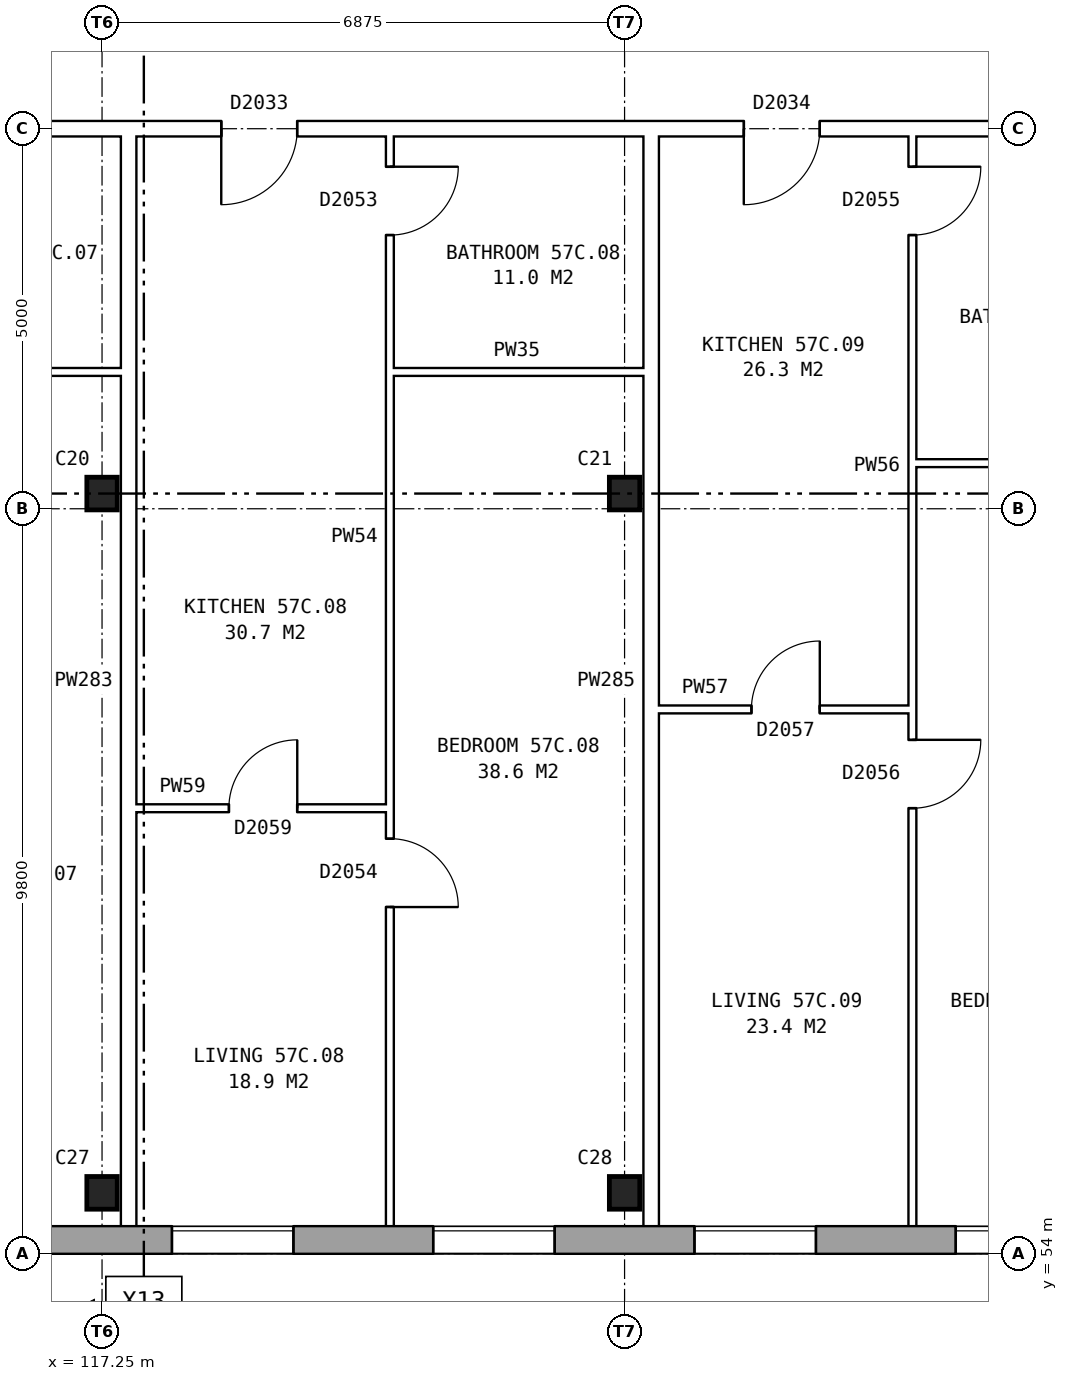
"""IFC4 building model, lengths in metres.
Left out: names, types, materials, properties, quantities, classifications, styles, units other than length and angle.
Written with IfcOpenShell. Run it as: python <this file> out.ifc"""

import sys

from ifc_helpers import new_model, si_unit, direction, frame, frame_2d, origin, origin_2d, place, context, subcontext, project, spatial, rectangle, i_section, extrude, element, fill, save


model = new_model("IFC4")
c1 = context("Model", 3, precision=1e-05, world=origin(), true_north=direction((0.0, 1.0)))
c2 = subcontext(c1, "Body", "Model", "MODEL_VIEW")
j1 = project(units=[si_unit("LENGTHUNIT", "METRE"), si_unit("PLANEANGLEUNIT", "RADIAN")], contexts=[c1])
p1 = place(None, origin())
s1 = spatial("IfcSite", under=j1, at=p1, CompositionType="ELEMENT")
p2 = place(p1, origin())
s2 = spatial("IfcBuilding", under=s1, at=p2, CompositionType="ELEMENT")
p3 = place(p2, frame((0.0, 0.0, 202.8)))
s3 = spatial("IfcBuildingStorey", under=s2, at=p3, CompositionType="ELEMENT", Elevation=202.8)
for number, where, z_axis, x_axis in (
    (1, (117.25, 54.8, 0.0), (0.0, 0.0, 1.0), (1.0, 0.0, 0.0)),
    (2, (124.125, 54.8, 0.0), (0.0, 0.0, 1.0), (1.0, 0.0, 0.0)),
    (3, (117.25, 64.0, 0.0), (0.0, 0.0, 1.0), (1.0, 0.0, 0.0)),
    (4, (124.125, 64.0, 0.0), (0.0, 0.0, 1.0), (1.0, 0.0, 0.0)),
):
    element("IfcColumn", number, at=place(p3, frame(where, z_axis=z_axis, x_axis=x_axis)), inside=s3, PredefinedType="COLUMN", context=c2, shape_type="SweptSolid", body=[
        extrude(i_section(OverallWidth=0.4, OverallDepth=0.43, WebThickness=0.04, FlangeThickness=0.04, at=origin_2d()), origin(), (0.0, 0.0, 1.0), 2.85),
    ])
p4 = place(p3, frame((75.95, 54.18, 0.0), z_axis=(0.0, 0.0, 1.0), x_axis=(1.0, 0.0, 0.0)))
e5 = element("IfcWall", 5, at=p4, inside=s3, PredefinedType="STANDARD", context=c2, shape_type="SweptSolid", body=[
    extrude(rectangle(XDim=55.1, YDim=0.36, at=frame_2d((27.55, 0.0))), origin(), (0.0, 0.0, 1.0), 2.85),
])
p5 = place(p4, frame((0.969, 0.0, 0.8)))
e6 = element("IfcOpeningElement", 6, at=p5, cuts=e5, PredefinedType="OPENING", context=c2, shape_type="SweptSolid", body=[
    extrude(rectangle(XDim=1.6, YDim=1.8, at=frame_2d((0.8, 0.9))), frame((0.0, 0.19, 0.0), z_axis=(0.0, -1.0, 0.0), x_axis=(1.0, 0.0, 0.0)), (0.0, 0.0, 1.0), 0.38),
])
p6 = place(p4, frame((4.406, 0.0, 0.8)))
e7 = element("IfcOpeningElement", 7, at=p6, cuts=e5, PredefinedType="OPENING", context=c2, shape_type="SweptSolid", body=[
    extrude(rectangle(XDim=1.6, YDim=1.8, at=frame_2d((0.8, 0.9))), frame((0.0, 0.19, 0.0), z_axis=(0.0, -1.0, 0.0), x_axis=(1.0, 0.0, 0.0)), (0.0, 0.0, 1.0), 0.38),
])
p7 = place(p4, frame((7.844, 0.0, 0.8)))
e8 = element("IfcOpeningElement", 8, at=p7, cuts=e5, PredefinedType="OPENING", context=c2, shape_type="SweptSolid", body=[
    extrude(rectangle(XDim=1.6, YDim=1.8, at=frame_2d((0.8, 0.9))), frame((0.0, 0.19, 0.0), z_axis=(0.0, -1.0, 0.0), x_axis=(1.0, 0.0, 0.0)), (0.0, 0.0, 1.0), 0.38),
])
p8 = place(p4, frame((11.281, 0.0, 0.8)))
e9 = element("IfcOpeningElement", 9, at=p8, cuts=e5, PredefinedType="OPENING", context=c2, shape_type="SweptSolid", body=[
    extrude(rectangle(XDim=1.6, YDim=1.8, at=frame_2d((0.8, 0.9))), frame((0.0, 0.19, 0.0), z_axis=(0.0, -1.0, 0.0), x_axis=(1.0, 0.0, 0.0)), (0.0, 0.0, 1.0), 0.38),
])
p9 = place(p4, frame((14.719, 0.0, 0.8)))
e10 = element("IfcOpeningElement", 10, at=p9, cuts=e5, PredefinedType="OPENING", context=c2, shape_type="SweptSolid", body=[
    extrude(rectangle(XDim=1.6, YDim=1.8, at=frame_2d((0.8, 0.9))), frame((0.0, 0.19, 0.0), z_axis=(0.0, -1.0, 0.0), x_axis=(1.0, 0.0, 0.0)), (0.0, 0.0, 1.0), 0.38),
])
p10 = place(p4, frame((18.156, 0.0, 0.8)))
e11 = element("IfcOpeningElement", 11, at=p10, cuts=e5, PredefinedType="OPENING", context=c2, shape_type="SweptSolid", body=[
    extrude(rectangle(XDim=1.6, YDim=1.8, at=frame_2d((0.8, 0.9))), frame((0.0, 0.19, 0.0), z_axis=(0.0, -1.0, 0.0), x_axis=(1.0, 0.0, 0.0)), (0.0, 0.0, 1.0), 0.38),
])
p11 = place(p4, frame((21.594, 0.0, 0.8)))
e12 = element("IfcOpeningElement", 12, at=p11, cuts=e5, PredefinedType="OPENING", context=c2, shape_type="SweptSolid", body=[
    extrude(rectangle(XDim=1.6, YDim=1.8, at=frame_2d((0.8, 0.9))), frame((0.0, 0.19, 0.0), z_axis=(0.0, -1.0, 0.0), x_axis=(1.0, 0.0, 0.0)), (0.0, 0.0, 1.0), 0.38),
])
p12 = place(p4, frame((25.031, 0.0, 0.8)))
e13 = element("IfcOpeningElement", 13, at=p12, cuts=e5, PredefinedType="OPENING", context=c2, shape_type="SweptSolid", body=[
    extrude(rectangle(XDim=1.6, YDim=1.8, at=frame_2d((0.8, 0.9))), frame((0.0, 0.19, 0.0), z_axis=(0.0, -1.0, 0.0), x_axis=(1.0, 0.0, 0.0)), (0.0, 0.0, 1.0), 0.38),
])
p13 = place(p4, frame((28.469, 0.0, 0.8)))
e14 = element("IfcOpeningElement", 14, at=p13, cuts=e5, PredefinedType="OPENING", context=c2, shape_type="SweptSolid", body=[
    extrude(rectangle(XDim=1.6, YDim=1.8, at=frame_2d((0.8, 0.9))), frame((0.0, 0.19, 0.0), z_axis=(0.0, -1.0, 0.0), x_axis=(1.0, 0.0, 0.0)), (0.0, 0.0, 1.0), 0.38),
])
p14 = place(p4, frame((31.906, 0.0, 0.8)))
e15 = element("IfcOpeningElement", 15, at=p14, cuts=e5, PredefinedType="OPENING", context=c2, shape_type="SweptSolid", body=[
    extrude(rectangle(XDim=1.6, YDim=1.8, at=frame_2d((0.8, 0.9))), frame((0.0, 0.19, 0.0), z_axis=(0.0, -1.0, 0.0), x_axis=(1.0, 0.0, 0.0)), (0.0, 0.0, 1.0), 0.38),
])
p15 = place(p4, frame((35.344, 0.0, 0.8)))
e16 = element("IfcOpeningElement", 16, at=p15, cuts=e5, PredefinedType="OPENING", context=c2, shape_type="SweptSolid", body=[
    extrude(rectangle(XDim=1.6, YDim=1.8, at=frame_2d((0.8, 0.9))), frame((0.0, 0.19, 0.0), z_axis=(0.0, -1.0, 0.0), x_axis=(1.0, 0.0, 0.0)), (0.0, 0.0, 1.0), 0.38),
])
p16 = place(p4, frame((38.781, 0.0, 0.8)))
e17 = element("IfcOpeningElement", 17, at=p16, cuts=e5, PredefinedType="OPENING", context=c2, shape_type="SweptSolid", body=[
    extrude(rectangle(XDim=1.6, YDim=1.8, at=frame_2d((0.8, 0.9))), frame((0.0, 0.19, 0.0), z_axis=(0.0, -1.0, 0.0), x_axis=(1.0, 0.0, 0.0)), (0.0, 0.0, 1.0), 0.38),
])
p17 = place(p4, frame((42.219, 0.0, 0.8)))
e18 = element("IfcOpeningElement", 18, at=p17, cuts=e5, PredefinedType="OPENING", context=c2, shape_type="SweptSolid", body=[
    extrude(rectangle(XDim=1.6, YDim=1.8, at=frame_2d((0.8, 0.9))), frame((0.0, 0.19, 0.0), z_axis=(0.0, -1.0, 0.0), x_axis=(1.0, 0.0, 0.0)), (0.0, 0.0, 1.0), 0.38),
])
p18 = place(p4, frame((45.656, 0.0, 0.8)))
e19 = element("IfcOpeningElement", 19, at=p18, cuts=e5, PredefinedType="OPENING", context=c2, shape_type="SweptSolid", body=[
    extrude(rectangle(XDim=1.6, YDim=1.8, at=frame_2d((0.8, 0.9))), frame((0.0, 0.19, 0.0), z_axis=(0.0, -1.0, 0.0), x_axis=(1.0, 0.0, 0.0)), (0.0, 0.0, 1.0), 0.38),
])
p19 = place(p4, frame((49.094, 0.0, 0.8)))
e20 = element("IfcOpeningElement", 20, at=p19, cuts=e5, PredefinedType="OPENING", context=c2, shape_type="SweptSolid", body=[
    extrude(rectangle(XDim=1.6, YDim=1.8, at=frame_2d((0.8, 0.9))), frame((0.0, 0.19, 0.0), z_axis=(0.0, -1.0, 0.0), x_axis=(1.0, 0.0, 0.0)), (0.0, 0.0, 1.0), 0.38),
])
p20 = place(p4, frame((52.531, 0.0, 0.8)))
e21 = element("IfcOpeningElement", 21, at=p20, cuts=e5, PredefinedType="OPENING", context=c2, shape_type="SweptSolid", body=[
    extrude(rectangle(XDim=1.6, YDim=1.8, at=frame_2d((0.8, 0.9))), frame((0.0, 0.19, 0.0), z_axis=(0.0, -1.0, 0.0), x_axis=(1.0, 0.0, 0.0)), (0.0, 0.0, 1.0), 0.38),
])
p21 = place(p3, frame((117.7, 59.86, 0.0), z_axis=(0.0, 0.0, 1.0), x_axis=(1.0, 0.0, 0.0)))
e22 = element("IfcWall", 22, at=p21, inside=s3, PredefinedType="PARTITIONING", context=c2, shape_type="SweptSolid", body=[
    extrude(rectangle(XDim=3.337, YDim=0.1, at=frame_2d((1.668, 0.0))), origin(), (0.0, 0.0, 1.0), 2.85),
])
p22 = place(p21, frame((1.219, 0.0, 0.0)))
e23 = element("IfcOpeningElement", 23, at=p22, cuts=e22, PredefinedType="OPENING", context=c2, shape_type="SweptSolid", body=[
    extrude(rectangle(XDim=0.9, YDim=2.1, at=frame_2d((0.45, 1.05))), frame((0.0, 0.06, 0.0), z_axis=(0.0, -1.0, 0.0), x_axis=(1.0, 0.0, 0.0)), (0.0, 0.0, 1.0), 0.12),
])
p23 = place(p3, frame((124.575, 61.16, 0.0), z_axis=(0.0, 0.0, 1.0), x_axis=(1.0, 0.0, 0.0)))
e24 = element("IfcWall", 24, at=p23, inside=s3, PredefinedType="PARTITIONING", context=c2, shape_type="SweptSolid", body=[
    extrude(rectangle(XDim=3.337, YDim=0.1, at=frame_2d((1.668, 0.0))), origin(), (0.0, 0.0, 1.0), 2.85),
])
p24 = place(p23, frame((1.219, 0.0, 0.0)))
e25 = element("IfcOpeningElement", 25, at=p24, cuts=e24, PredefinedType="OPENING", context=c2, shape_type="SweptSolid", body=[
    extrude(rectangle(XDim=0.9, YDim=2.1, at=frame_2d((0.45, 1.05))), frame((0.0, 0.06, 0.0), z_axis=(0.0, -1.0, 0.0), x_axis=(1.0, 0.0, 0.0)), (0.0, 0.0, 1.0), 0.12),
])
p25 = place(p3, frame((127.912, 64.4, 0.0), z_axis=(0.0, 0.0, 1.0), x_axis=(1.0, 0.0, 0.0)))
e26 = element("IfcWall", 26, at=p25, inside=s3, PredefinedType="PARTITIONING", context=c2, shape_type="SweptSolid", body=[
    extrude(rectangle(XDim=3.448, YDim=0.1, at=frame_2d((1.724, 0.0))), origin(), (0.0, 0.0, 1.0), 2.85),
])
for number, where, z_axis, x_axis in (
    (27, (114.162, 65.6, 0.0), (0.0, 0.0, 1.0), (1.0, 0.0, 0.0)),
    (28, (121.037, 65.6, 0.0), (0.0, 0.0, 1.0), (1.0, 0.0, 0.0)),
):
    element("IfcWall", number, at=place(p3, frame(where, z_axis=z_axis, x_axis=x_axis)), inside=s3, PredefinedType="PARTITIONING", context=c2, shape_type="SweptSolid", body=[
        extrude(rectangle(XDim=3.338, YDim=0.1, at=frame_2d((1.669, 0.0))), origin(), (0.0, 0.0, 1.0), 2.85),
    ])
p26 = place(p3, frame((75.64, 68.8, 0.0), z_axis=(0.0, 0.0, 1.0), x_axis=(1.0, 0.0, 0.0)))
e29 = element("IfcWall", 29, at=p26, inside=s3, PredefinedType="PARTITIONING", context=c2, shape_type="SweptSolid", body=[
    extrude(rectangle(XDim=55.72, YDim=0.2, at=frame_2d((27.86, 0.0))), origin(), (0.0, 0.0, 1.0), 2.85),
])
p27 = place(p26, frame((5.191, 0.0, 0.0)))
e30 = element("IfcOpeningElement", 30, at=p27, cuts=e29, PredefinedType="OPENING", context=c2, shape_type="SweptSolid", body=[
    extrude(rectangle(XDim=1.0, YDim=2.1, at=frame_2d((0.5, 1.05))), frame((0.0, 0.11, 0.0), z_axis=(0.0, -1.0, 0.0), x_axis=(1.0, 0.0, 0.0)), (0.0, 0.0, 1.0), 0.22),
])
p28 = place(p26, frame((12.241, 0.0, 0.0)))
e31 = element("IfcOpeningElement", 31, at=p28, cuts=e29, PredefinedType="OPENING", context=c2, shape_type="SweptSolid", body=[
    extrude(rectangle(XDim=1.0, YDim=2.1, at=frame_2d((0.5, 1.05))), frame((0.0, 0.11, 0.0), z_axis=(0.0, -1.0, 0.0), x_axis=(1.0, 0.0, 0.0)), (0.0, 0.0, 1.0), 0.22),
])
p29 = place(p26, frame((22.553, 0.0, 0.0)))
e32 = element("IfcOpeningElement", 32, at=p29, cuts=e29, PredefinedType="OPENING", context=c2, shape_type="SweptSolid", body=[
    extrude(rectangle(XDim=1.0, YDim=2.1, at=frame_2d((0.5, 1.05))), frame((0.0, 0.11, 0.0), z_axis=(0.0, -1.0, 0.0), x_axis=(1.0, 0.0, 0.0)), (0.0, 0.0, 1.0), 0.22),
])
p30 = place(p26, frame((32.866, 0.0, 0.0)))
e33 = element("IfcOpeningElement", 33, at=p30, cuts=e29, PredefinedType="OPENING", context=c2, shape_type="SweptSolid", body=[
    extrude(rectangle(XDim=1.0, YDim=2.1, at=frame_2d((0.5, 1.05))), frame((0.0, 0.11, 0.0), z_axis=(0.0, -1.0, 0.0), x_axis=(1.0, 0.0, 0.0)), (0.0, 0.0, 1.0), 0.22),
])
p31 = place(p26, frame((36.303, 0.0, 0.0)))
e34 = element("IfcOpeningElement", 34, at=p31, cuts=e29, PredefinedType="OPENING", context=c2, shape_type="SweptSolid", body=[
    extrude(rectangle(XDim=1.0, YDim=2.1, at=frame_2d((0.5, 1.05))), frame((0.0, 0.11, 0.0), z_axis=(0.0, -1.0, 0.0), x_axis=(1.0, 0.0, 0.0)), (0.0, 0.0, 1.0), 0.22),
])
p32 = place(p26, frame((43.178, 0.0, 0.0)))
e35 = element("IfcOpeningElement", 35, at=p32, cuts=e29, PredefinedType="OPENING", context=c2, shape_type="SweptSolid", body=[
    extrude(rectangle(XDim=1.0, YDim=2.1, at=frame_2d((0.5, 1.05))), frame((0.0, 0.11, 0.0), z_axis=(0.0, -1.0, 0.0), x_axis=(1.0, 0.0, 0.0)), (0.0, 0.0, 1.0), 0.22),
])
p33 = place(p26, frame((50.053, 0.0, 0.0)))
e36 = element("IfcOpeningElement", 36, at=p33, cuts=e29, PredefinedType="OPENING", context=c2, shape_type="SweptSolid", body=[
    extrude(rectangle(XDim=1.0, YDim=2.1, at=frame_2d((0.5, 1.05))), frame((0.0, 0.11, 0.0), z_axis=(0.0, -1.0, 0.0), x_axis=(1.0, 0.0, 0.0)), (0.0, 0.0, 1.0), 0.22),
])
p34 = place(p3, frame((117.6, 54.36, 0.0), z_axis=(0.0, 0.0, 1.0), x_axis=(0.0, 1.0, 0.0)))
e37 = element("IfcWall", 37, at=p34, inside=s3, PredefinedType="PARTITIONING", context=c2, shape_type="SweptSolid", body=[
    extrude(rectangle(XDim=14.34, YDim=0.2, at=frame_2d((7.17, 0.0))), origin(), (0.0, 0.0, 1.0), 2.85),
])
p35 = place(p3, frame((121.037, 54.36, 0.0), z_axis=(0.0, 0.0, 1.0), x_axis=(0.0, 1.0, 0.0)))
e38 = element("IfcWall", 38, at=p35, inside=s3, PredefinedType="PARTITIONING", context=c2, shape_type="SweptSolid", body=[
    extrude(rectangle(XDim=14.34, YDim=0.1, at=frame_2d((7.17, 0.0))), origin(), (0.0, 0.0, 1.0), 2.85),
])
p36 = place(p35, frame((4.2, 0.0, 0.0)))
e39 = element("IfcOpeningElement", 39, at=p36, cuts=e38, PredefinedType="OPENING", context=c2, shape_type="SweptSolid", body=[
    extrude(rectangle(XDim=0.9, YDim=2.1, at=frame_2d((0.45, 1.05))), frame((0.0, 0.06, 0.0), z_axis=(0.0, -1.0, 0.0), x_axis=(1.0, 0.0, 0.0)), (0.0, 0.0, 1.0), 0.12),
])
p37 = place(p35, frame((13.04, 0.0, 0.0)))
e40 = element("IfcOpeningElement", 40, at=p37, cuts=e38, PredefinedType="OPENING", context=c2, shape_type="SweptSolid", body=[
    extrude(rectangle(XDim=0.9, YDim=2.1, at=frame_2d((0.45, 1.05))), frame((0.0, 0.06, 0.0), z_axis=(0.0, -1.0, 0.0), x_axis=(1.0, 0.0, 0.0)), (0.0, 0.0, 1.0), 0.12),
])
p38 = place(p3, frame((124.475, 54.36, 0.0), z_axis=(0.0, 0.0, 1.0), x_axis=(0.0, 1.0, 0.0)))
e41 = element("IfcWall", 41, at=p38, inside=s3, PredefinedType="PARTITIONING", context=c2, shape_type="SweptSolid", body=[
    extrude(rectangle(XDim=14.34, YDim=0.2, at=frame_2d((7.17, 0.0))), origin(), (0.0, 0.0, 1.0), 2.85),
])
p39 = place(p3, frame((127.912, 54.36, 0.0), z_axis=(0.0, 0.0, 1.0), x_axis=(0.0, 1.0, 0.0)))
e42 = element("IfcWall", 42, at=p39, inside=s3, PredefinedType="PARTITIONING", context=c2, shape_type="SweptSolid", body=[
    extrude(rectangle(XDim=14.34, YDim=0.1, at=frame_2d((7.17, 0.0))), origin(), (0.0, 0.0, 1.0), 2.85),
])
p40 = place(p39, frame((5.5, 0.0, 0.0)))
e43 = element("IfcOpeningElement", 43, at=p40, cuts=e42, PredefinedType="OPENING", context=c2, shape_type="SweptSolid", body=[
    extrude(rectangle(XDim=0.9, YDim=2.1, at=frame_2d((0.45, 1.05))), frame((0.0, 0.06, 0.0), z_axis=(0.0, -1.0, 0.0), x_axis=(1.0, 0.0, 0.0)), (0.0, 0.0, 1.0), 0.12),
])
p41 = place(p39, frame((13.04, 0.0, 0.0)))
e44 = element("IfcOpeningElement", 44, at=p41, cuts=e42, PredefinedType="OPENING", context=c2, shape_type="SweptSolid", body=[
    extrude(rectangle(XDim=0.9, YDim=2.1, at=frame_2d((0.45, 1.05))), frame((0.0, 0.06, 0.0), z_axis=(0.0, -1.0, 0.0), x_axis=(1.0, 0.0, 0.0)), (0.0, 0.0, 1.0), 0.12),
])
p42 = place(p17, origin())
e45 = element("IfcWindow", 45, at=p42, inside=s3, PartitioningType="SINGLE_PANEL", PredefinedType="WINDOW", context=c2, shape_type="SweptSolid", body=[
    extrude(rectangle(XDim=1.6, YDim=1.8, at=frame_2d((0.8, 0.9))), frame((0.0, 0.15, 0.0), z_axis=(0.0, -1.0, 0.0), x_axis=(1.0, 0.0, 0.0)), (0.0, 0.0, 1.0), 0.06),
])
fill(e18, e45)
p43 = place(p18, origin())
e46 = element("IfcWindow", 46, at=p43, inside=s3, PartitioningType="SINGLE_PANEL", PredefinedType="WINDOW", context=c2, shape_type="SweptSolid", body=[
    extrude(rectangle(XDim=1.6, YDim=1.8, at=frame_2d((0.8, 0.9))), frame((0.0, 0.15, 0.0), z_axis=(0.0, -1.0, 0.0), x_axis=(1.0, 0.0, 0.0)), (0.0, 0.0, 1.0), 0.06),
])
fill(e19, e46)
p44 = place(p19, origin())
e47 = element("IfcWindow", 47, at=p44, inside=s3, PartitioningType="SINGLE_PANEL", PredefinedType="WINDOW", context=c2, shape_type="SweptSolid", body=[
    extrude(rectangle(XDim=1.6, YDim=1.8, at=frame_2d((0.8, 0.9))), frame((0.0, 0.15, 0.0), z_axis=(0.0, -1.0, 0.0), x_axis=(1.0, 0.0, 0.0)), (0.0, 0.0, 1.0), 0.06),
])
fill(e20, e47)
p45 = place(p20, origin())
e48 = element("IfcWindow", 48, at=p45, inside=s3, PartitioningType="SINGLE_PANEL", PredefinedType="WINDOW", context=c2, shape_type="SweptSolid", body=[
    extrude(rectangle(XDim=1.6, YDim=1.8, at=frame_2d((0.8, 0.9))), frame((0.0, 0.15, 0.0), z_axis=(0.0, -1.0, 0.0), x_axis=(1.0, 0.0, 0.0)), (0.0, 0.0, 1.0), 0.06),
])
fill(e21, e48)
p46 = place(p36, frame((0.9, 0.0, 0.0), z_axis=(0.0, 0.0, 1.0), x_axis=(-1.0, 0.0, 0.0)))
e49 = element("IfcDoor", 49, at=p46, inside=s3, OperationType="SINGLE_SWING_RIGHT", PredefinedType="DOOR", context=c2, shape_type="SweptSolid", body=[
    extrude(rectangle(XDim=0.9, YDim=2.1, at=frame_2d((0.45, 1.05))), frame((0.0, 0.025, 0.0), z_axis=(0.0, -1.0, 0.0), x_axis=(1.0, 0.0, 0.0)), (0.0, 0.0, 1.0), 0.05),
])
fill(e39, e49)
p47 = place(p32, frame((1.0, 0.0, 0.0), z_axis=(0.0, 0.0, 1.0), x_axis=(-1.0, 0.0, 0.0)))
e50 = element("IfcDoor", 50, at=p47, inside=s3, OperationType="SINGLE_SWING_RIGHT", PredefinedType="DOOR", context=c2, shape_type="SweptSolid", body=[
    extrude(rectangle(XDim=1.0, YDim=2.1, at=frame_2d((0.5, 1.05))), frame((0.0, 0.025, 0.0), z_axis=(0.0, -1.0, 0.0), x_axis=(1.0, 0.0, 0.0)), (0.0, 0.0, 1.0), 0.05),
])
fill(e35, e50)
p48 = place(p22, origin())
e51 = element("IfcDoor", 51, at=p48, inside=s3, OperationType="SINGLE_SWING_RIGHT", PredefinedType="DOOR", context=c2, shape_type="SweptSolid", body=[
    extrude(rectangle(XDim=0.9, YDim=2.1, at=frame_2d((0.45, 1.05))), frame((0.0, 0.025, 0.0), z_axis=(0.0, -1.0, 0.0), x_axis=(1.0, 0.0, 0.0)), (0.0, 0.0, 1.0), 0.05),
])
fill(e23, e51)
p49 = place(p37, frame((0.9, 0.0, 0.0), z_axis=(0.0, 0.0, 1.0), x_axis=(-1.0, 0.0, 0.0)))
e52 = element("IfcDoor", 52, at=p49, inside=s3, OperationType="SINGLE_SWING_LEFT", PredefinedType="DOOR", context=c2, shape_type="SweptSolid", body=[
    extrude(rectangle(XDim=0.9, YDim=2.1, at=frame_2d((0.45, 1.05))), frame((0.0, 0.025, 0.0), z_axis=(0.0, -1.0, 0.0), x_axis=(1.0, 0.0, 0.0)), (0.0, 0.0, 1.0), 0.05),
])
fill(e40, e52)
p50 = place(p40, frame((0.9, 0.0, 0.0), z_axis=(0.0, 0.0, 1.0), x_axis=(-1.0, 0.0, 0.0)))
e53 = element("IfcDoor", 53, at=p50, inside=s3, OperationType="SINGLE_SWING_LEFT", PredefinedType="DOOR", context=c2, shape_type="SweptSolid", body=[
    extrude(rectangle(XDim=0.9, YDim=2.1, at=frame_2d((0.45, 1.05))), frame((0.0, 0.025, 0.0), z_axis=(0.0, -1.0, 0.0), x_axis=(1.0, 0.0, 0.0)), (0.0, 0.0, 1.0), 0.05),
])
fill(e43, e53)
p51 = place(p33, frame((1.0, 0.0, 0.0), z_axis=(0.0, 0.0, 1.0), x_axis=(-1.0, 0.0, 0.0)))
e54 = element("IfcDoor", 54, at=p51, inside=s3, OperationType="SINGLE_SWING_RIGHT", PredefinedType="DOOR", context=c2, shape_type="SweptSolid", body=[
    extrude(rectangle(XDim=1.0, YDim=2.1, at=frame_2d((0.5, 1.05))), frame((0.0, 0.025, 0.0), z_axis=(0.0, -1.0, 0.0), x_axis=(1.0, 0.0, 0.0)), (0.0, 0.0, 1.0), 0.05),
])
fill(e36, e54)
p52 = place(p24, origin())
e55 = element("IfcDoor", 55, at=p52, inside=s3, OperationType="SINGLE_SWING_RIGHT", PredefinedType="DOOR", context=c2, shape_type="SweptSolid", body=[
    extrude(rectangle(XDim=0.9, YDim=2.1, at=frame_2d((0.45, 1.05))), frame((0.0, 0.025, 0.0), z_axis=(0.0, -1.0, 0.0), x_axis=(1.0, 0.0, 0.0)), (0.0, 0.0, 1.0), 0.05),
])
fill(e25, e55)
p53 = place(p41, frame((0.9, 0.0, 0.0), z_axis=(0.0, 0.0, 1.0), x_axis=(-1.0, 0.0, 0.0)))
e56 = element("IfcDoor", 56, at=p53, inside=s3, OperationType="SINGLE_SWING_LEFT", PredefinedType="DOOR", context=c2, shape_type="SweptSolid", body=[
    extrude(rectangle(XDim=0.9, YDim=2.1, at=frame_2d((0.45, 1.05))), frame((0.0, 0.025, 0.0), z_axis=(0.0, -1.0, 0.0), x_axis=(1.0, 0.0, 0.0)), (0.0, 0.0, 1.0), 0.05),
])
fill(e44, e56)
save(model, sys.argv[1])
